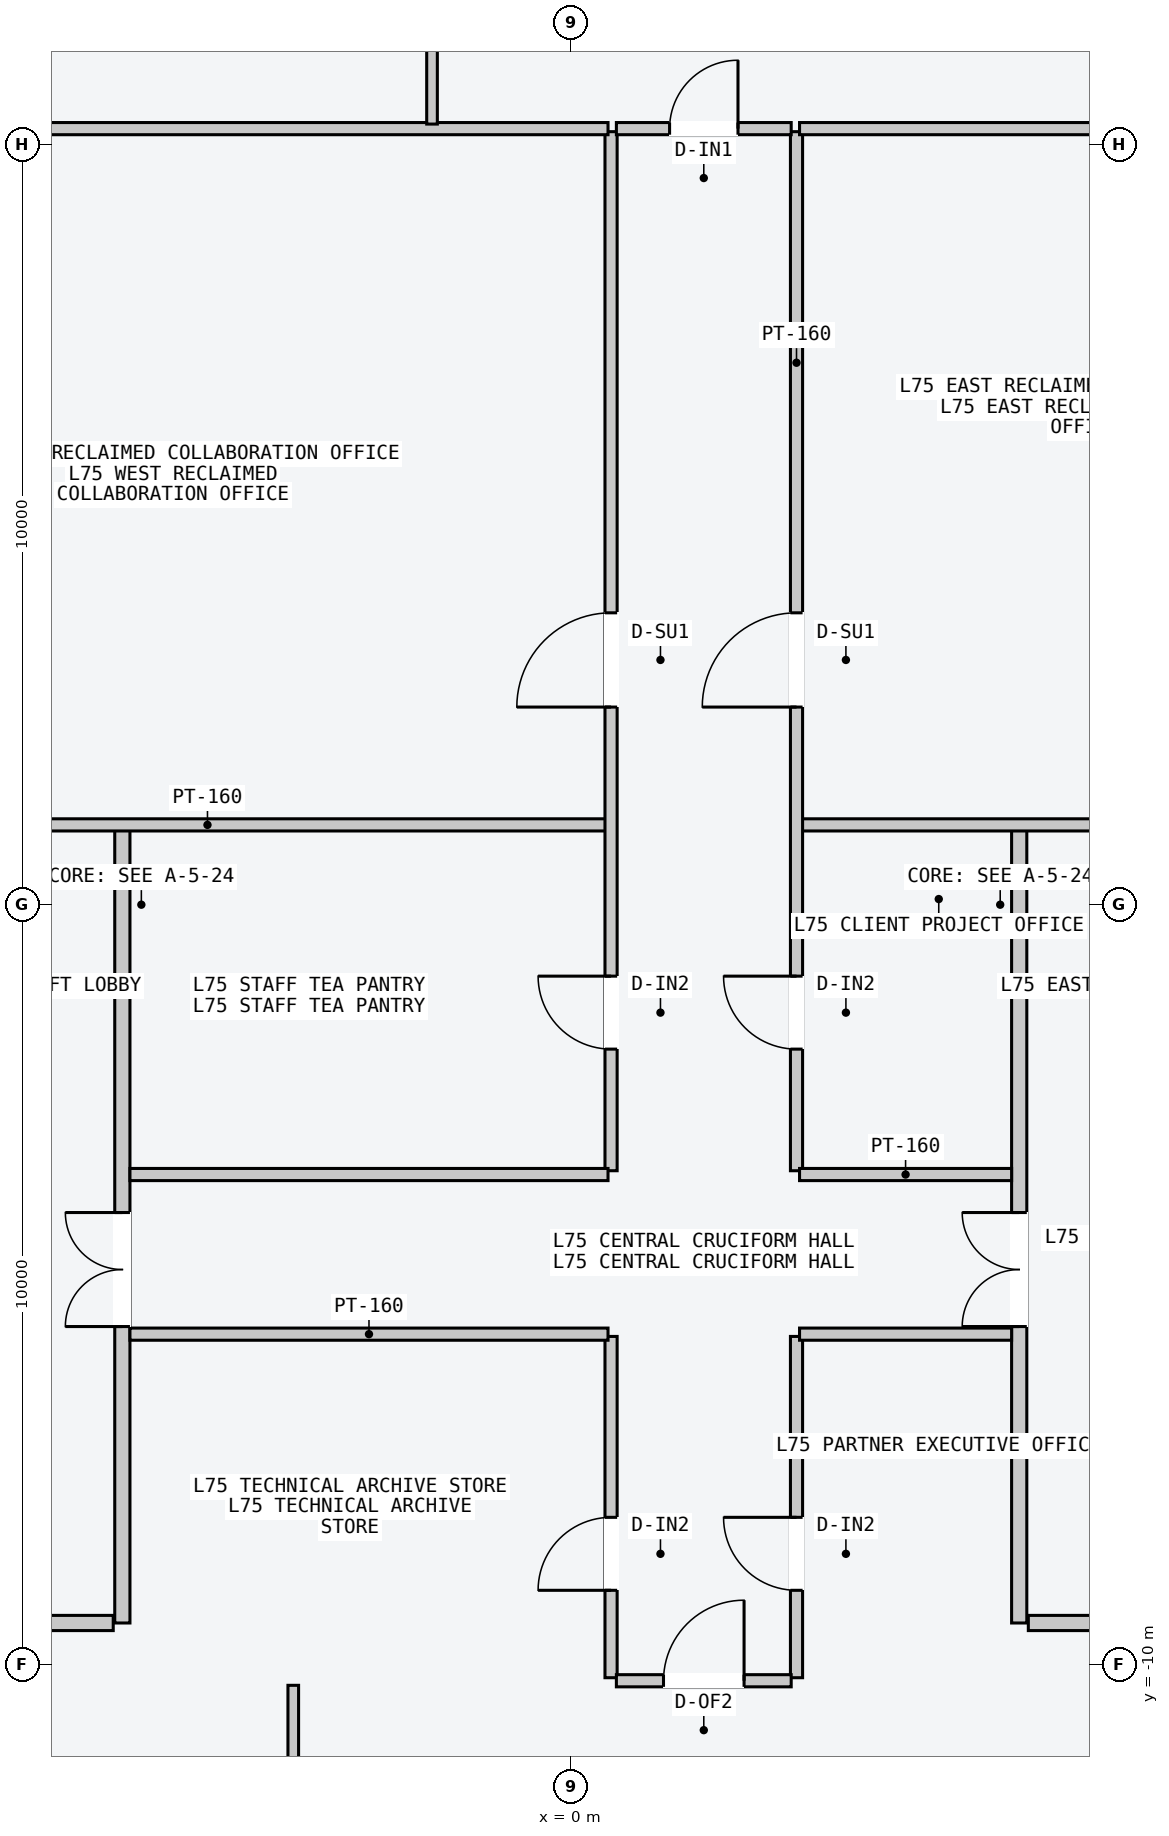
"""IFC4 building model, lengths in metres.
Left out: names, types, materials, properties, quantities, classifications, styles, units other than length and angle.
Written with IfcOpenShell. Run it as: python <this file> out.ifc"""

import sys

from ifc_helpers import new_model, si_unit, direction, frame, frame_2d, origin, place, context, subcontext, project, spatial, rectangle, extrude, element, fill, save


model = new_model("IFC4")
c1 = context("Model", 3, precision=1e-05, world=origin(), true_north=direction((0.0, 1.0)))
c2 = subcontext(c1, "Body", "Model", "MODEL_VIEW")
j1 = project(units=[si_unit("LENGTHUNIT", "METRE"), si_unit("PLANEANGLEUNIT", "RADIAN")], contexts=[c1])
p1 = place(None, origin())
s1 = spatial("IfcSite", under=j1, at=p1, CompositionType="ELEMENT")
p2 = place(p1, origin())
s2 = spatial("IfcBuilding", under=s1, at=p2, CompositionType="ELEMENT")
p3 = place(p2, frame((0.0, 0.0, 284.4)))
s3 = spatial("IfcBuildingStorey", under=s2, at=p3, CompositionType="ELEMENT", Elevation=284.4)
p4 = place(p3, frame((-5.9, -9.45, 0.0), z_axis=(0.0, 0.0, 1.0), x_axis=(0.0, 1.0, 0.0)))
e1 = element("IfcWall", 1, at=p4, inside=s3, PredefinedType="PARTITIONING", context=c2, shape_type="SweptSolid", body=[
    extrude(rectangle(XDim=10.5, YDim=0.2, at=frame_2d((5.25, 0.0))), origin(), (0.0, 0.0, 1.0), 4.6),
])
p5 = place(p4, frame((3.9, 0.0, 0.0)))
e2 = element("IfcOpeningElement", 2, at=p5, cuts=e1, PredefinedType="OPENING", context=c2, shape_type="SweptSolid", body=[
    extrude(rectangle(XDim=1.5, YDim=2.2, at=frame_2d((0.75, 1.1))), frame((0.0, 0.11, 0.0), z_axis=(0.0, -1.0, 0.0), x_axis=(1.0, 0.0, 0.0)), (0.0, 0.0, 1.0), 0.22),
])
p6 = place(p3, frame((-6.02, -9.45, 0.0), z_axis=(0.0, 0.0, 1.0), x_axis=(-1.0, 0.0, 0.0)))
e3 = element("IfcWall", 3, at=p6, inside=s3, PredefinedType="PARTITIONING", context=c2, shape_type="SweptSolid", body=[
    extrude(rectangle(XDim=1.8, YDim=0.2, at=frame_2d((0.9, 0.0))), origin(), (0.0, 0.0, 1.0), 4.6),
])
p7 = place(p3, frame((5.9, -9.45, 0.0), z_axis=(0.0, 0.0, 1.0), x_axis=(0.0, 1.0, 0.0)))
e4 = element("IfcWall", 4, at=p7, inside=s3, PredefinedType="PARTITIONING", context=c2, shape_type="SweptSolid", body=[
    extrude(rectangle(XDim=10.5, YDim=0.2, at=frame_2d((5.25, 0.0))), origin(), (0.0, 0.0, 1.0), 4.6),
])
p8 = place(p7, frame((3.9, 0.0, 0.0)))
e5 = element("IfcOpeningElement", 5, at=p8, cuts=e4, PredefinedType="OPENING", context=c2, shape_type="SweptSolid", body=[
    extrude(rectangle(XDim=1.5, YDim=2.2, at=frame_2d((0.75, 1.1))), frame((0.0, 0.11, 0.0), z_axis=(0.0, -1.0, 0.0), x_axis=(1.0, 0.0, 0.0)), (0.0, 0.0, 1.0), 0.22),
])
p9 = place(p3, frame((6.02, -9.45, 0.0), z_axis=(0.0, 0.0, 1.0), x_axis=(1.0, 0.0, 0.0)))
e6 = element("IfcWall", 6, at=p9, inside=s3, PredefinedType="PARTITIONING", context=c2, shape_type="SweptSolid", body=[
    extrude(rectangle(XDim=1.8, YDim=0.2, at=frame_2d((0.9, 0.0))), origin(), (0.0, 0.0, 1.0), 4.6),
])
p10 = place(p3, frame((-10.05, 1.05, 0.0), z_axis=(0.0, 0.0, 1.0), x_axis=(1.0, 0.0, 0.0)))
e7 = element("IfcWall", 7, at=p10, inside=s3, PredefinedType="PARTITIONING", context=c2, shape_type="SweptSolid", body=[
    extrude(rectangle(XDim=10.54, YDim=0.16, at=frame_2d((5.27, 0.0))), origin(), (0.0, 0.0, 1.0), 4.6),
])
p11 = place(p3, frame((0.53, -3.5, 0.0), z_axis=(0.0, 0.0, 1.0), x_axis=(0.0, 1.0, 0.0)))
e8 = element("IfcWall", 8, at=p11, inside=s3, PredefinedType="PARTITIONING", context=c2, shape_type="SweptSolid", body=[
    extrude(rectangle(XDim=13.67, YDim=0.16, at=frame_2d((6.835, 0.0))), origin(), (0.0, 0.0, 1.0), 4.6),
])
p12 = place(p11, frame((6.1, 0.0, 0.0)))
e9 = element("IfcOpeningElement", 9, at=p12, cuts=e8, PredefinedType="OPENING", context=c2, shape_type="SweptSolid", body=[
    extrude(rectangle(XDim=1.24, YDim=2.24, at=frame_2d((0.62, 1.12))), frame((0.0, 0.09, 0.0), z_axis=(0.0, -1.0, 0.0), x_axis=(1.0, 0.0, 0.0)), (0.0, 0.0, 1.0), 0.18),
])
p13 = place(p11, frame((1.6, 0.0, 0.0)))
e10 = element("IfcOpeningElement", 10, at=p13, cuts=e8, PredefinedType="OPENING", context=c2, shape_type="SweptSolid", body=[
    extrude(rectangle(XDim=0.96, YDim=2.18, at=frame_2d((0.48, 1.09))), frame((0.0, 0.09, 0.0), z_axis=(0.0, -1.0, 0.0), x_axis=(1.0, 0.0, 0.0)), (0.0, 0.0, 1.0), 0.18),
])
p14 = place(p3, frame((-7.5, 10.21, 0.0), z_axis=(0.0, 0.0, 1.0), x_axis=(1.0, 0.0, 0.0)))
e11 = element("IfcWall", 11, at=p14, inside=s3, PredefinedType="PARTITIONING", context=c2, shape_type="SweptSolid", body=[
    extrude(rectangle(XDim=7.99, YDim=0.16, at=frame_2d((3.995, 0.0))), origin(), (0.0, 0.0, 1.0), 4.6),
])
p15 = place(p3, frame((-5.8, -3.55, 0.0), z_axis=(0.0, 0.0, 1.0), x_axis=(1.0, 0.0, 0.0)))
e12 = element("IfcWall", 12, at=p15, inside=s3, PredefinedType="PARTITIONING", context=c2, shape_type="SweptSolid", body=[
    extrude(rectangle(XDim=6.29, YDim=0.16, at=frame_2d((3.145, 0.0))), origin(), (0.0, 0.0, 1.0), 4.6),
])
p16 = place(p3, frame((3.01, 1.05, 0.0), z_axis=(0.0, 0.0, 1.0), x_axis=(1.0, 0.0, 0.0)))
e13 = element("IfcWall", 13, at=p16, inside=s3, PredefinedType="PARTITIONING", context=c2, shape_type="SweptSolid", body=[
    extrude(rectangle(XDim=7.05, YDim=0.16, at=frame_2d((3.525, 0.0))), origin(), (0.0, 0.0, 1.0), 4.6),
])
p17 = place(p3, frame((2.97, -3.5, 0.0), z_axis=(0.0, 0.0, 1.0), x_axis=(0.0, 1.0, 0.0)))
e14 = element("IfcWall", 14, at=p17, inside=s3, PredefinedType="PARTITIONING", context=c2, shape_type="SweptSolid", body=[
    extrude(rectangle(XDim=13.67, YDim=0.16, at=frame_2d((6.835, 0.0))), origin(), (0.0, 0.0, 1.0), 4.6),
])
p18 = place(p17, frame((6.1, 0.0, 0.0)))
e15 = element("IfcOpeningElement", 15, at=p18, cuts=e14, PredefinedType="OPENING", context=c2, shape_type="SweptSolid", body=[
    extrude(rectangle(XDim=1.24, YDim=2.24, at=frame_2d((0.62, 1.12))), frame((0.0, 0.09, 0.0), z_axis=(0.0, -1.0, 0.0), x_axis=(1.0, 0.0, 0.0)), (0.0, 0.0, 1.0), 0.18),
])
p19 = place(p17, frame((1.6, 0.0, 0.0)))
e16 = element("IfcOpeningElement", 16, at=p19, cuts=e14, PredefinedType="OPENING", context=c2, shape_type="SweptSolid", body=[
    extrude(rectangle(XDim=0.96, YDim=2.18, at=frame_2d((0.48, 1.09))), frame((0.0, 0.09, 0.0), z_axis=(0.0, -1.0, 0.0), x_axis=(1.0, 0.0, 0.0)), (0.0, 0.0, 1.0), 0.18),
])
p20 = place(p3, frame((3.01, 10.21, 0.0), z_axis=(0.0, 0.0, 1.0), x_axis=(1.0, 0.0, 0.0)))
e17 = element("IfcWall", 17, at=p20, inside=s3, PredefinedType="PARTITIONING", context=c2, shape_type="SweptSolid", body=[
    extrude(rectangle(XDim=4.49, YDim=0.16, at=frame_2d((2.245, 0.0))), origin(), (0.0, 0.0, 1.0), 4.6),
])
p21 = place(p3, frame((3.01, -3.55, 0.0), z_axis=(0.0, 0.0, 1.0), x_axis=(1.0, 0.0, 0.0)))
e18 = element("IfcWall", 18, at=p21, inside=s3, PredefinedType="PARTITIONING", context=c2, shape_type="SweptSolid", body=[
    extrude(rectangle(XDim=2.79, YDim=0.16, at=frame_2d((1.395, 0.0))), origin(), (0.0, 0.0, 1.0), 4.6),
])
p22 = place(p3, frame((0.53, -10.17, 0.0), z_axis=(0.0, 0.0, 1.0), x_axis=(0.0, 1.0, 0.0)))
e19 = element("IfcWall", 19, at=p22, inside=s3, PredefinedType="PARTITIONING", context=c2, shape_type="SweptSolid", body=[
    extrude(rectangle(XDim=4.49, YDim=0.16, at=frame_2d((2.245, 0.0))), origin(), (0.0, 0.0, 1.0), 4.6),
])
p23 = place(p22, frame((1.15, 0.0, 0.0)))
e20 = element("IfcOpeningElement", 20, at=p23, cuts=e19, PredefinedType="OPENING", context=c2, shape_type="SweptSolid", body=[
    extrude(rectangle(XDim=0.96, YDim=2.18, at=frame_2d((0.48, 1.09))), frame((0.0, 0.09, 0.0), z_axis=(0.0, -1.0, 0.0), x_axis=(1.0, 0.0, 0.0)), (0.0, 0.0, 1.0), 0.18),
])
p24 = place(p3, frame((2.97, -10.17, 0.0), z_axis=(0.0, 0.0, 1.0), x_axis=(0.0, 1.0, 0.0)))
e21 = element("IfcWall", 21, at=p24, inside=s3, PredefinedType="PARTITIONING", context=c2, shape_type="SweptSolid", body=[
    extrude(rectangle(XDim=4.49, YDim=0.16, at=frame_2d((2.245, 0.0))), origin(), (0.0, 0.0, 1.0), 4.6),
])
p25 = place(p24, frame((1.15, 0.0, 0.0)))
e22 = element("IfcOpeningElement", 22, at=p25, cuts=e21, PredefinedType="OPENING", context=c2, shape_type="SweptSolid", body=[
    extrude(rectangle(XDim=0.96, YDim=2.18, at=frame_2d((0.48, 1.09))), frame((0.0, 0.09, 0.0), z_axis=(0.0, -1.0, 0.0), x_axis=(1.0, 0.0, 0.0)), (0.0, 0.0, 1.0), 0.18),
])
p26 = place(p3, frame((-5.8, -5.65, 0.0), z_axis=(0.0, 0.0, 1.0), x_axis=(1.0, 0.0, 0.0)))
e23 = element("IfcWall", 23, at=p26, inside=s3, PredefinedType="PARTITIONING", context=c2, shape_type="SweptSolid", body=[
    extrude(rectangle(XDim=6.29, YDim=0.16, at=frame_2d((3.145, 0.0))), origin(), (0.0, 0.0, 1.0), 4.6),
])
p27 = place(p3, frame((3.01, -5.65, 0.0), z_axis=(0.0, 0.0, 1.0), x_axis=(1.0, 0.0, 0.0)))
e24 = element("IfcWall", 24, at=p27, inside=s3, PredefinedType="PARTITIONING", context=c2, shape_type="SweptSolid", body=[
    extrude(rectangle(XDim=2.79, YDim=0.16, at=frame_2d((1.395, 0.0))), origin(), (0.0, 0.0, 1.0), 4.6),
])
p28 = place(p3, frame((-1.826, 10.27, 0.0), z_axis=(0.0, 0.0, 1.0), x_axis=(0.0, 1.0, 0.0)))
e25 = element("IfcWall", 25, at=p28, inside=s3, PredefinedType="PARTITIONING", context=c2, shape_type="SweptSolid", body=[
    extrude(rectangle(XDim=7.29, YDim=0.14, at=frame_2d((3.645, 0.0))), origin(), (0.0, 0.0, 1.0), 4.6),
])
p29 = place(p28, frame((1.15, 0.0, 0.0)))
e26 = element("IfcOpeningElement", 26, at=p29, cuts=e25, PredefinedType="OPENING", context=c2, shape_type="SweptSolid", body=[
    extrude(rectangle(XDim=0.96, YDim=2.18, at=frame_2d((0.48, 1.09))), frame((0.0, 0.08, 0.0), z_axis=(0.0, -1.0, 0.0), x_axis=(1.0, 0.0, 0.0)), (0.0, 0.0, 1.0), 0.16),
])
p30 = place(p3, frame((0.6, 10.21, 0.0), z_axis=(0.0, 0.0, 1.0), x_axis=(1.0, 0.0, 0.0)))
e27 = element("IfcWall", 27, at=p30, inside=s3, PredefinedType="PARTITIONING", context=c2, shape_type="SweptSolid", body=[
    extrude(rectangle(XDim=2.3, YDim=0.16, at=frame_2d((1.15, 0.0))), origin(), (0.0, 0.0, 1.0), 4.6),
])
p31 = place(p30, frame((0.7, 0.0, 0.0)))
e28 = element("IfcOpeningElement", 28, at=p31, cuts=e27, PredefinedType="OPENING", context=c2, shape_type="SweptSolid", body=[
    extrude(rectangle(XDim=0.9, YDim=2.15, at=frame_2d((0.45, 1.075))), frame((0.0, 0.09, 0.0), z_axis=(0.0, -1.0, 0.0), x_axis=(1.0, 0.0, 0.0)), (0.0, 0.0, 1.0), 0.18),
])
p32 = place(p3, frame((-3.651, -17.56, 0.0), z_axis=(0.0, 0.0, 1.0), x_axis=(0.0, 1.0, 0.0)))
e29 = element("IfcWall", 29, at=p32, inside=s3, PredefinedType="PARTITIONING", context=c2, shape_type="SweptSolid", body=[
    extrude(rectangle(XDim=7.29, YDim=0.14, at=frame_2d((3.645, 0.0))), origin(), (0.0, 0.0, 1.0), 4.6),
])
p33 = place(p32, frame((1.05, 0.0, 0.0)))
e30 = element("IfcOpeningElement", 30, at=p33, cuts=e29, PredefinedType="OPENING", context=c2, shape_type="SweptSolid", body=[
    extrude(rectangle(XDim=0.96, YDim=2.18, at=frame_2d((0.48, 1.09))), frame((0.0, 0.08, 0.0), z_axis=(0.0, -1.0, 0.0), x_axis=(1.0, 0.0, 0.0)), (0.0, 0.0, 1.0), 0.16),
])
p34 = place(p3, frame((0.6, -10.21, 0.0), z_axis=(0.0, 0.0, 1.0), x_axis=(1.0, 0.0, 0.0)))
e31 = element("IfcWall", 31, at=p34, inside=s3, PredefinedType="PARTITIONING", context=c2, shape_type="SweptSolid", body=[
    extrude(rectangle(XDim=2.3, YDim=0.16, at=frame_2d((1.15, 0.0))), origin(), (0.0, 0.0, 1.0), 4.6),
])
p35 = place(p34, frame((0.62, 0.0, 0.0)))
e32 = element("IfcOpeningElement", 32, at=p35, cuts=e31, PredefinedType="OPENING", context=c2, shape_type="SweptSolid", body=[
    extrude(rectangle(XDim=1.06, YDim=2.2, at=frame_2d((0.53, 1.1))), frame((0.0, 0.09, 0.0), z_axis=(0.0, -1.0, 0.0), x_axis=(1.0, 0.0, 0.0)), (0.0, 0.0, 1.0), 0.18),
])
p36 = place(p5, origin())
e33 = element("IfcDoor", 33, at=p36, inside=s3, OperationType="DOUBLE_DOOR_SINGLE_SWING", PredefinedType="DOOR", context=c2, shape_type="SweptSolid", body=[
    extrude(rectangle(XDim=1.5, YDim=2.2, at=frame_2d((0.75, 1.1))), frame((0.0, 0.025, 0.0), z_axis=(0.0, -1.0, 0.0), x_axis=(1.0, 0.0, 0.0)), (0.0, 0.0, 1.0), 0.05),
])
fill(e2, e33)
p37 = place(p8, origin())
e34 = element("IfcDoor", 34, at=p37, inside=s3, OperationType="DOUBLE_DOOR_SINGLE_SWING", PredefinedType="DOOR", context=c2, shape_type="SweptSolid", body=[
    extrude(rectangle(XDim=1.5, YDim=2.2, at=frame_2d((0.75, 1.1))), frame((0.0, 0.025, 0.0), z_axis=(0.0, -1.0, 0.0), x_axis=(1.0, 0.0, 0.0)), (0.0, 0.0, 1.0), 0.05),
])
fill(e5, e34)
p38 = place(p12, origin())
e35 = element("IfcDoor", 35, at=p38, inside=s3, OperationType="SINGLE_SWING_LEFT", PredefinedType="DOOR", context=c2, shape_type="SweptSolid", body=[
    extrude(rectangle(XDim=1.24, YDim=2.24, at=frame_2d((0.62, 1.12))), frame((0.0, 0.025, 0.0), z_axis=(0.0, -1.0, 0.0), x_axis=(1.0, 0.0, 0.0)), (0.0, 0.0, 1.0), 0.05),
])
fill(e9, e35)
p39 = place(p13, origin())
e36 = element("IfcDoor", 36, at=p39, inside=s3, OperationType="SINGLE_SWING_RIGHT", PredefinedType="DOOR", context=c2, shape_type="SweptSolid", body=[
    extrude(rectangle(XDim=0.96, YDim=2.18, at=frame_2d((0.48, 1.09))), frame((0.0, 0.025, 0.0), z_axis=(0.0, -1.0, 0.0), x_axis=(1.0, 0.0, 0.0)), (0.0, 0.0, 1.0), 0.05),
])
fill(e10, e36)
p40 = place(p18, origin())
e37 = element("IfcDoor", 37, at=p40, inside=s3, OperationType="SINGLE_SWING_LEFT", PredefinedType="DOOR", context=c2, shape_type="SweptSolid", body=[
    extrude(rectangle(XDim=1.24, YDim=2.24, at=frame_2d((0.62, 1.12))), frame((0.0, 0.025, 0.0), z_axis=(0.0, -1.0, 0.0), x_axis=(1.0, 0.0, 0.0)), (0.0, 0.0, 1.0), 0.05),
])
fill(e15, e37)
p41 = place(p19, origin())
e38 = element("IfcDoor", 38, at=p41, inside=s3, OperationType="SINGLE_SWING_RIGHT", PredefinedType="DOOR", context=c2, shape_type="SweptSolid", body=[
    extrude(rectangle(XDim=0.96, YDim=2.18, at=frame_2d((0.48, 1.09))), frame((0.0, 0.025, 0.0), z_axis=(0.0, -1.0, 0.0), x_axis=(1.0, 0.0, 0.0)), (0.0, 0.0, 1.0), 0.05),
])
fill(e16, e38)
p42 = place(p23, origin())
e39 = element("IfcDoor", 39, at=p42, inside=s3, OperationType="SINGLE_SWING_LEFT", PredefinedType="DOOR", context=c2, shape_type="SweptSolid", body=[
    extrude(rectangle(XDim=0.96, YDim=2.18, at=frame_2d((0.48, 1.09))), frame((0.0, 0.025, 0.0), z_axis=(0.0, -1.0, 0.0), x_axis=(1.0, 0.0, 0.0)), (0.0, 0.0, 1.0), 0.05),
])
fill(e20, e39)
p43 = place(p25, origin())
e40 = element("IfcDoor", 40, at=p43, inside=s3, OperationType="SINGLE_SWING_RIGHT", PredefinedType="DOOR", context=c2, shape_type="SweptSolid", body=[
    extrude(rectangle(XDim=0.96, YDim=2.18, at=frame_2d((0.48, 1.09))), frame((0.0, 0.025, 0.0), z_axis=(0.0, -1.0, 0.0), x_axis=(1.0, 0.0, 0.0)), (0.0, 0.0, 1.0), 0.05),
])
fill(e22, e40)
p44 = place(p31, origin())
e41 = element("IfcDoor", 41, at=p44, inside=s3, OperationType="SINGLE_SWING_RIGHT", PredefinedType="DOOR", context=c2, shape_type="SweptSolid", body=[
    extrude(rectangle(XDim=0.9, YDim=2.15, at=frame_2d((0.45, 1.075))), frame((0.0, 0.025, 0.0), z_axis=(0.0, -1.0, 0.0), x_axis=(1.0, 0.0, 0.0)), (0.0, 0.0, 1.0), 0.05),
])
fill(e28, e41)
p45 = place(p35, origin())
e42 = element("IfcDoor", 42, at=p45, inside=s3, OperationType="SINGLE_SWING_RIGHT", PredefinedType="DOOR", context=c2, shape_type="SweptSolid", body=[
    extrude(rectangle(XDim=1.06, YDim=2.2, at=frame_2d((0.53, 1.1))), frame((0.0, 0.025, 0.0), z_axis=(0.0, -1.0, 0.0), x_axis=(1.0, 0.0, 0.0)), (0.0, 0.0, 1.0), 0.05),
])
fill(e32, e42)
save(model, sys.argv[1])
